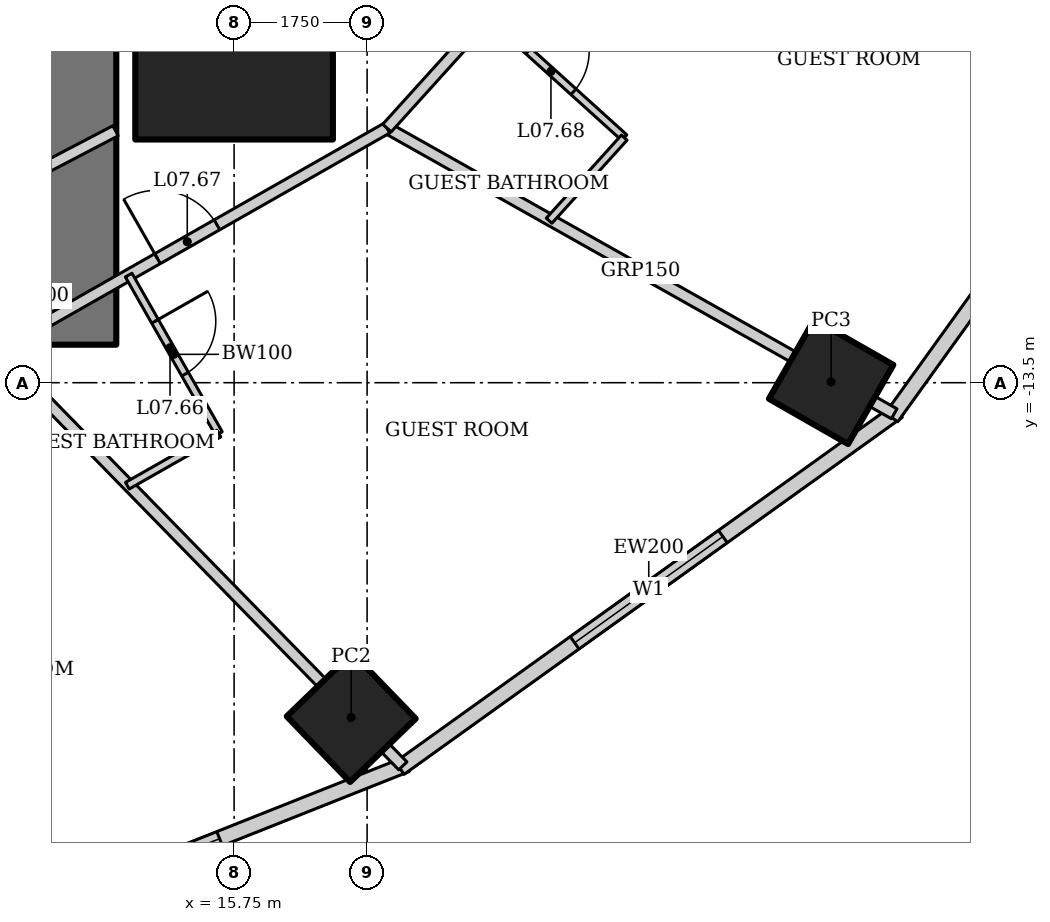
"""IFC4 building model, lengths in metres.
Left out: names, types, materials, properties, quantities, classifications, styles, units other than length and angle.
Written with IfcOpenShell. Run it as: python <this file> out.ifc"""

import sys

from ifc_helpers import new_model, si_unit, direction, frame, frame_2d, origin, origin_2d, place, context, subcontext, project, spatial, rectangle, hollow_rectangle, extrude, element, fill, save


model = new_model("IFC4")
c1 = context("Model", 3, precision=1e-05, world=origin(), true_north=direction((0.0, 1.0)))
c2 = subcontext(c1, "Body", "Model", "MODEL_VIEW")
j1 = project(units=[si_unit("LENGTHUNIT", "METRE"), si_unit("PLANEANGLEUNIT", "RADIAN")], contexts=[c1])
p1 = place(None, origin())
s1 = spatial("IfcSite", under=j1, at=p1, CompositionType="ELEMENT")
p2 = place(p1, origin())
s2 = spatial("IfcBuilding", under=s1, at=p2, CompositionType="ELEMENT")
p3 = place(p2, frame((0.0, 0.0, 40.6)))
s3 = spatial("IfcBuildingStorey", under=s2, at=p3, CompositionType="ELEMENT", Elevation=40.6)
p4 = place(p3, frame((15.75, -9.0, 0.0), z_axis=(0.0, 0.0, 1.0), x_axis=(1.0, 0.0, 0.0)))
e1 = element("IfcColumn", 1, at=p4, inside=s3, PredefinedType="COLUMN", context=c2, shape_type="SweptSolid", body=[
    extrude(hollow_rectangle(XDim=2.6, YDim=2.6, WallThickness=0.13, at=origin_2d()), origin(), (0.0, 0.0, 1.0), 3.6),
])
p5 = place(p3, frame((17.291, -17.905, 0.0), z_axis=(0.0, 0.0, 1.0), x_axis=(0.719339800339, 0.694658370459, 0.0)))
e2 = element("IfcColumn", 2, at=p5, inside=s3, PredefinedType="COLUMN", context=c2, shape_type="SweptSolid", body=[
    extrude(hollow_rectangle(XDim=1.2, YDim=1.2, WallThickness=0.1, at=origin_2d()), origin(), (0.0, 0.0, 1.0), 3.6),
])
p6 = place(p3, frame((23.605, -13.489, 0.0), z_axis=(0.0, 0.0, 1.0), x_axis=(0.496139221777, 0.86824298017, 0.0)))
e3 = element("IfcColumn", 3, at=p6, inside=s3, PredefinedType="COLUMN", context=c2, shape_type="SweptSolid", body=[
    extrude(hollow_rectangle(XDim=1.2, YDim=1.2, WallThickness=0.12, at=origin_2d()), origin(), (0.0, 0.0, 1.0), 3.6),
])
p7 = place(p3, frame((13.2, -13.0, 0.0), z_axis=(0.0, 0.0, 1.0), x_axis=(0.0, 1.0, 0.0)))
e4 = element("IfcWall", 4, at=p7, inside=s3, PredefinedType="SHEAR", context=c2, shape_type="SweptSolid", body=[
    extrude(rectangle(XDim=26.0, YDim=2.0, at=frame_2d((13.0, 0.0))), origin(), (0.0, 0.0, 1.0), 3.6),
])
p8 = place(p7, frame((12.1, 0.0, 0.0)))
e5 = element("IfcOpeningElement", 5, at=p8, cuts=e4, PredefinedType="OPENING", context=c2, shape_type="SweptSolid", body=[
    extrude(rectangle(XDim=1.8, YDim=2.1, at=frame_2d((0.9, 1.05))), frame((0.0, 1.01, 0.0), z_axis=(0.0, -1.0, 0.0), x_axis=(1.0, 0.0, 0.0)), (0.0, 0.0, 1.0), 2.02),
])
p9 = place(p3, frame((10.869, -21.363, 0.0), z_axis=(0.0, 0.0, 1.0), x_axis=(0.929358351251, 0.369178892895, 0.0)))
e6 = element("IfcWall", 6, at=p9, inside=s3, PredefinedType="SOLIDWALL", context=c2, shape_type="SweptSolid", body=[
    extrude(rectangle(XDim=7.692, YDim=0.2, at=frame_2d((3.846, 0.0))), origin(), (0.0, 0.0, 1.0), 3.45),
])
p10 = place(p9, frame((2.646, 0.0, 0.5)))
e7 = element("IfcOpeningElement", 7, at=p10, cuts=e6, PredefinedType="OPENING", context=c2, shape_type="SweptSolid", body=[
    extrude(rectangle(XDim=2.4, YDim=2.2, at=frame_2d((1.2, 1.1))), frame((0.0, 0.11, 0.0), z_axis=(0.0, -1.0, 0.0), x_axis=(1.0, 0.0, 0.0)), (0.0, 0.0, 1.0), 0.22),
])
p11 = place(p3, frame((17.929, -18.572, 0.0), z_axis=(0.0, 0.0, 1.0), x_axis=(0.812791321576, 0.582554948112, 0.0)))
e8 = element("IfcWall", 8, at=p11, inside=s3, PredefinedType="SOLIDWALL", context=c2, shape_type="SweptSolid", body=[
    extrude(rectangle(XDim=8.063, YDim=0.2, at=frame_2d((4.032, 0.0))), origin(), (0.0, 0.0, 1.0), 3.45),
])
p12 = place(p11, frame((2.832, 0.0, 0.5)))
e9 = element("IfcOpeningElement", 9, at=p12, cuts=e8, PredefinedType="OPENING", context=c2, shape_type="SweptSolid", body=[
    extrude(rectangle(XDim=2.4, YDim=2.2, at=frame_2d((1.2, 1.1))), frame((0.0, 0.11, 0.0), z_axis=(0.0, -1.0, 0.0), x_axis=(1.0, 0.0, 0.0)), (0.0, 0.0, 1.0), 0.22),
])
p13 = place(p3, frame((24.4, -13.957, 0.0), z_axis=(0.0, 0.0, 1.0), x_axis=(0.583937613703, 0.811798536155, 0.0)))
e10 = element("IfcWall", 10, at=p13, inside=s3, PredefinedType="SOLIDWALL", context=c2, shape_type="SweptSolid", body=[
    extrude(rectangle(XDim=8.323, YDim=0.2, at=frame_2d((4.162, 0.0))), origin(), (0.0, 0.0, 1.0), 3.45),
])
p14 = place(p13, frame((2.961, 0.0, 0.5)))
e11 = element("IfcOpeningElement", 11, at=p14, cuts=e10, PredefinedType="OPENING", context=c2, shape_type="SweptSolid", body=[
    extrude(rectangle(XDim=2.4, YDim=2.2, at=frame_2d((1.2, 1.1))), frame((0.0, 0.11, 0.0), z_axis=(0.0, -1.0, 0.0), x_axis=(1.0, 0.0, 0.0)), (0.0, 0.0, 1.0), 0.22),
])
p15 = place(p3, frame((17.97, -18.542, 0.0), z_axis=(0.0, 0.0, 1.0), x_axis=(-0.699032031211, 0.715090357467, 0.0)))
e12 = element("IfcWall", 12, at=p15, inside=s3, PredefinedType="PARTITIONING", context=c2, shape_type="SweptSolid", body=[
    extrude(rectangle(XDim=7.647, YDim=0.15, at=frame_2d((3.824, 0.0))), origin(), (0.0, 0.0, 1.0), 2.528),
])
p16 = place(p3, frame((24.435, -13.909, 0.0), z_axis=(0.0, 0.0, 1.0), x_axis=(-0.871267209855, 0.490808974074, 0.0)))
e13 = element("IfcWall", 13, at=p16, inside=s3, PredefinedType="PARTITIONING", context=c2, shape_type="SweptSolid", body=[
    extrude(rectangle(XDim=7.659, YDim=0.15, at=frame_2d((3.83, 0.0))), origin(), (0.0, 0.0, 1.0), 2.693),
])
p17 = place(p3, frame((12.625, -13.073, 0.0), z_axis=(0.0, 0.0, 1.0), x_axis=(0.86907565943, 0.494679187136, 0.0)))
e14 = element("IfcWall", 14, at=p17, inside=s3, PredefinedType="PARTITIONING", context=c2, shape_type="SweptSolid", body=[
    extrude(rectangle(XDim=5.911, YDim=0.15, at=frame_2d((2.955, 0.0))), origin(), (0.0, 0.0, 1.0), 3.45),
])
p18 = place(p17, frame((2.437, 0.0, 0.0)))
e15 = element("IfcOpeningElement", 15, at=p18, cuts=e14, PredefinedType="OPENING", context=c2, shape_type="SweptSolid", body=[
    extrude(rectangle(XDim=0.9, YDim=2.1, at=frame_2d((0.45, 1.05))), frame((0.0, 0.085, 0.0), z_axis=(0.0, -1.0, 0.0), x_axis=(1.0, 0.0, 0.0)), (0.0, 0.0, 1.0), 0.17),
])
p19 = place(p3, frame((17.761, -10.149, 0.0), z_axis=(0.0, 0.0, 1.0), x_axis=(0.670598380282, 0.741820606591, 0.0)))
e16 = element("IfcWall", 16, at=p19, inside=s3, PredefinedType="PARTITIONING", context=c2, shape_type="SweptSolid", body=[
    extrude(rectangle(XDim=6.293, YDim=0.15, at=frame_2d((3.147, 0.0))), origin(), (0.0, 0.0, 1.0), 3.45),
])
p20 = place(p19, frame((5.244, 0.0, 0.0)))
e17 = element("IfcOpeningElement", 17, at=p20, cuts=e16, PredefinedType="OPENING", context=c2, shape_type="SweptSolid", body=[
    extrude(rectangle(XDim=0.9, YDim=2.1, at=frame_2d((0.45, 1.05))), frame((0.0, 0.085, 0.0), z_axis=(0.0, -1.0, 0.0), x_axis=(1.0, 0.0, 0.0)), (0.0, 0.0, 1.0), 0.17),
])
p21 = place(p3, frame((14.363, -12.084, 0.0), z_axis=(0.0, 0.0, 1.0), x_axis=(0.494703113698, -0.869062039959, 0.0)))
e18 = element("IfcWall", 18, at=p21, inside=s3, PredefinedType="PARTITIONING", context=c2, shape_type="SweptSolid", body=[
    extrude(rectangle(XDim=2.4, YDim=0.1, at=frame_2d((1.2, 0.0))), origin(), (0.0, 0.0, 1.0), 3.45),
])
p22 = place(p21, frame((0.7, 0.0, 0.0)))
e19 = element("IfcOpeningElement", 19, at=p22, cuts=e18, PredefinedType="OPENING", context=c2, shape_type="SweptSolid", body=[
    extrude(rectangle(XDim=0.8, YDim=2.1, at=frame_2d((0.4, 1.05))), frame((0.0, 0.06, 0.0), z_axis=(0.0, -1.0, 0.0), x_axis=(1.0, 0.0, 0.0)), (0.0, 0.0, 1.0), 0.12),
])
p23 = place(p3, frame((15.55, -14.17, 0.0), z_axis=(0.0, 0.0, 1.0), x_axis=(-0.869065896633, -0.494696338485, 0.0)))
e20 = element("IfcWall", 20, at=p23, inside=s3, PredefinedType="PARTITIONING", context=c2, shape_type="SweptSolid", body=[
    extrude(rectangle(XDim=1.386, YDim=0.1, at=frame_2d((0.693, 0.0))), origin(), (0.0, 0.0, 1.0), 3.45),
])
p24 = place(p3, frame((19.103, -8.666, 0.0), z_axis=(0.0, 0.0, 1.0), x_axis=(0.741861025859, -0.670553665496, 0.0)))
e21 = element("IfcWall", 21, at=p24, inside=s3, PredefinedType="PARTITIONING", context=c2, shape_type="SweptSolid", body=[
    extrude(rectangle(XDim=2.4, YDim=0.1, at=frame_2d((1.2, 0.0))), origin(), (0.0, 0.0, 1.0), 3.45),
])
p25 = place(p24, frame((0.7, 0.0, 0.0)))
e22 = element("IfcOpeningElement", 22, at=p25, cuts=e21, PredefinedType="OPENING", context=c2, shape_type="SweptSolid", body=[
    extrude(rectangle(XDim=0.8, YDim=2.1, at=frame_2d((0.4, 1.05))), frame((0.0, 0.06, 0.0), z_axis=(0.0, -1.0, 0.0), x_axis=(1.0, 0.0, 0.0)), (0.0, 0.0, 1.0), 0.12),
])
p26 = place(p3, frame((20.883, -10.275, 0.0), z_axis=(0.0, 0.0, 1.0), x_axis=(-0.670592268759, -0.7418261313, 0.0)))
e23 = element("IfcWall", 23, at=p26, inside=s3, PredefinedType="PARTITIONING", context=c2, shape_type="SweptSolid", body=[
    extrude(rectangle(XDim=1.474, YDim=0.1, at=frame_2d((0.737, 0.0))), origin(), (0.0, 0.0, 1.0), 3.45),
])
p27 = place(p3, frame((11.296, -11.698, 0.0), z_axis=(0.0, 0.0, 1.0), x_axis=(0.886283344337, 0.463143426544, 0.0)))
e24 = element("IfcWall", 24, at=p27, inside=s3, PredefinedType="PARTITIONING", context=c2, shape_type="SweptSolid", body=[
    extrude(rectangle(XDim=3.265, YDim=0.15, at=frame_2d((1.633, 0.0))), origin(), (0.0, 0.0, 1.0), 3.45),
])
p28 = place(p10, origin())
e25 = element("IfcWindow", 25, at=p28, inside=s3, PartitioningType="SINGLE_PANEL", PredefinedType="WINDOW", context=c2, shape_type="SweptSolid", body=[
    extrude(rectangle(XDim=2.4, YDim=2.2, at=frame_2d((1.2, 1.1))), frame((0.0, 0.03, 0.0), z_axis=(0.0, -1.0, 0.0), x_axis=(1.0, 0.0, 0.0)), (0.0, 0.0, 1.0), 0.06),
])
fill(e7, e25)
p29 = place(p12, origin())
e26 = element("IfcWindow", 26, at=p29, inside=s3, PartitioningType="SINGLE_PANEL", PredefinedType="WINDOW", context=c2, shape_type="SweptSolid", body=[
    extrude(rectangle(XDim=2.4, YDim=2.2, at=frame_2d((1.2, 1.1))), frame((0.0, 0.03, 0.0), z_axis=(0.0, -1.0, 0.0), x_axis=(1.0, 0.0, 0.0)), (0.0, 0.0, 1.0), 0.06),
])
fill(e9, e26)
p30 = place(p22, origin())
e27 = element("IfcDoor", 27, at=p30, inside=s3, OperationType="SINGLE_SWING_LEFT", PredefinedType="DOOR", context=c2, shape_type="SweptSolid", body=[
    extrude(rectangle(XDim=0.8, YDim=2.1, at=frame_2d((0.4, 1.05))), frame((0.0, 0.025, 0.0), z_axis=(0.0, -1.0, 0.0), x_axis=(1.0, 0.0, 0.0)), (0.0, 0.0, 1.0), 0.05),
])
fill(e19, e27)
p31 = place(p18, origin())
e28 = element("IfcDoor", 28, at=p31, inside=s3, OperationType="SINGLE_SWING_LEFT", PredefinedType="DOOR", context=c2, shape_type="SweptSolid", body=[
    extrude(rectangle(XDim=0.9, YDim=2.1, at=frame_2d((0.45, 1.05))), frame((0.0, 0.025, 0.0), z_axis=(0.0, -1.0, 0.0), x_axis=(1.0, 0.0, 0.0)), (0.0, 0.0, 1.0), 0.05),
])
fill(e15, e28)
p32 = place(p25, origin())
e29 = element("IfcDoor", 29, at=p32, inside=s3, OperationType="SINGLE_SWING_LEFT", PredefinedType="DOOR", context=c2, shape_type="SweptSolid", body=[
    extrude(rectangle(XDim=0.8, YDim=2.1, at=frame_2d((0.4, 1.05))), frame((0.0, 0.025, 0.0), z_axis=(0.0, -1.0, 0.0), x_axis=(1.0, 0.0, 0.0)), (0.0, 0.0, 1.0), 0.05),
])
fill(e22, e29)
save(model, sys.argv[1])
